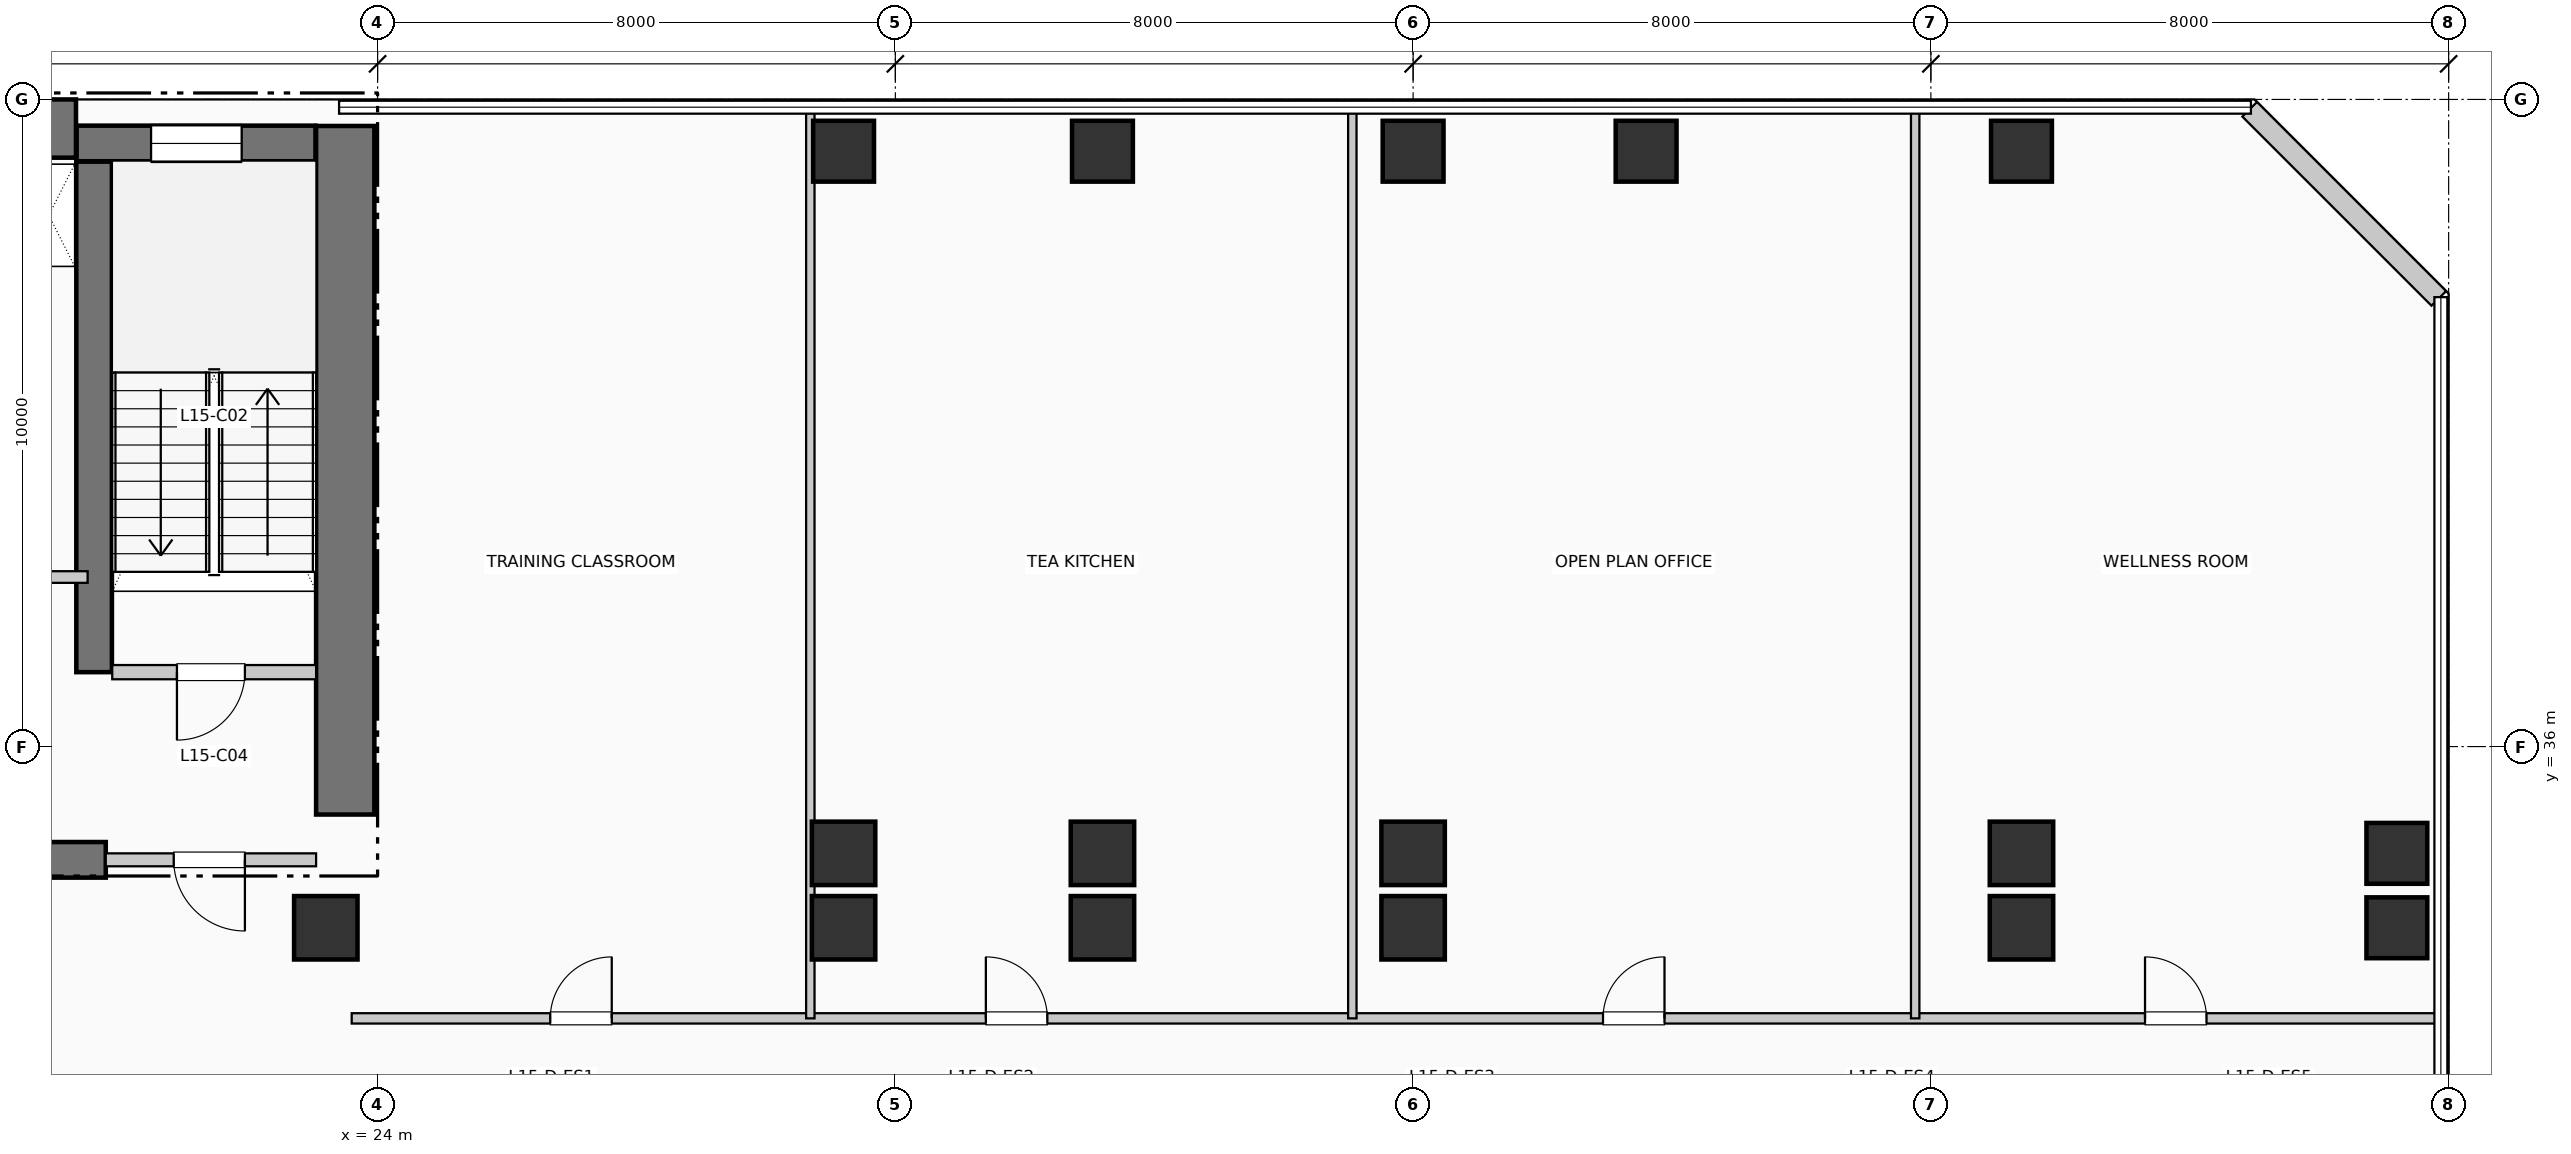
"""IFC4 building model, lengths in metres.
Left out: names, types, materials, properties, quantities, classifications, styles, units other than length and angle.
Written with IfcOpenShell. Run it as: python <this file> out.ifc"""

import sys

from ifc_helpers import new_model, si_unit, direction, frame, frame_2d, origin, origin_2d, place, context, subcontext, project, spatial, rectangle, extrude, element, fill, save


model = new_model("IFC4")
c1 = context("Model", 3, precision=1e-05, world=origin(), true_north=direction((0.0, 1.0)))
c2 = subcontext(c1, "Body", "Model", "MODEL_VIEW")
j1 = project(units=[si_unit("LENGTHUNIT", "METRE"), si_unit("PLANEANGLEUNIT", "RADIAN")], contexts=[c1])
p1 = place(None, origin())
s1 = spatial("IfcSite", under=j1, at=p1, CompositionType="ELEMENT")
p2 = place(p1, origin())
s2 = spatial("IfcBuilding", under=s1, at=p2, CompositionType="ELEMENT")
p3 = place(p2, frame((0.0, 0.0, 66.0)))
s3 = spatial("IfcBuildingStorey", under=s2, at=p3, CompositionType="ELEMENT", Elevation=66.0)
p4 = place(p3, frame((5.36, 45.55, 0.0), z_axis=(0.0, 0.0, 1.0), x_axis=(1.0, 0.0, 0.0)))
e1 = element("IfcWall", 1, at=p4, inside=s3, PredefinedType="SHEAR", context=c2, shape_type="SweptSolid", body=[
    extrude(rectangle(XDim=13.98, YDim=0.9, at=frame_2d((6.99, 0.0))), origin(), (0.0, 0.0, 1.0), 3.96),
])
p5 = place(p3, frame((23.5, 34.95, 0.0), z_axis=(0.0, 0.0, 1.0), x_axis=(0.0, 1.0, 0.0)))
e2 = element("IfcWall", 2, at=p5, inside=s3, PredefinedType="SHEAR", context=c2, shape_type="SweptSolid", body=[
    extrude(rectangle(XDim=10.64, YDim=0.9, at=frame_2d((5.32, 0.0))), origin(), (0.0, 0.0, 1.0), 3.96),
])
p6 = place(p3, frame((13.68, 34.25, 0.0), z_axis=(0.0, 0.0, 1.0), x_axis=(1.0, 0.0, 0.0)))
e3 = element("IfcWall", 3, at=p6, inside=s3, PredefinedType="SHEAR", context=c2, shape_type="SweptSolid", body=[
    extrude(rectangle(XDim=6.12, YDim=0.55, at=frame_2d((3.06, 0.0))), origin(), (0.0, 0.0, 1.0), 3.96),
])
p7 = place(p3, frame((19.62, 37.15, 0.0), z_axis=(0.0, 0.0, 1.0), x_axis=(0.0, 1.0, 0.0)))
e4 = element("IfcWall", 4, at=p7, inside=s3, PredefinedType="SHEAR", context=c2, shape_type="SweptSolid", body=[
    extrude(rectangle(XDim=7.89, YDim=0.55, at=frame_2d((3.945, 0.0))), origin(), (0.0, 0.0, 1.0), 3.96),
])
p8 = place(p3, frame((19.35, 45.32, 0.0), z_axis=(0.0, 0.0, 1.0), x_axis=(1.0, 0.0, 0.0)))
e5 = element("IfcWall", 5, at=p8, inside=s3, PredefinedType="SHEAR", context=c2, shape_type="SweptSolid", body=[
    extrude(rectangle(XDim=3.69, YDim=0.55, at=frame_2d((1.845, 0.0))), origin(), (0.0, 0.0, 1.0), 3.96),
])
p9 = place(p8, frame((1.15, 0.0, 1.05)))
e6 = element("IfcOpeningElement", 6, at=p9, cuts=e5, PredefinedType="OPENING", context=c2, shape_type="SweptSolid", body=[
    extrude(rectangle(XDim=1.4, YDim=1.8, at=frame_2d((0.7, 0.9))), frame((0.0, 0.285, 0.0), z_axis=(0.0, -1.0, 0.0), x_axis=(1.0, 0.0, 0.0)), (0.0, 0.0, 1.0), 0.57),
])
for number, where, z_axis, x_axis in (
    (7, (23.2, 33.2, 0.0), (0.0, 0.0, 1.0), (1.0, 0.0, 0.0)),
    (8, (31.2, 33.2, 0.0), (0.0, 0.0, 1.0), (1.0, 0.0, 0.0)),
    (9, (31.2, 34.35, 0.0), (0.0, 0.0, 1.0), (1.0, 0.0, 0.0)),
):
    element("IfcColumn", number, at=place(p3, frame(where, z_axis=z_axis, x_axis=x_axis)), inside=s3, PredefinedType="COLUMN", context=c2, shape_type="SweptSolid", body=[
        extrude(rectangle(XDim=0.98, YDim=0.98, at=origin_2d()), origin(), (0.0, 0.0, 1.0), 3.96),
    ])
p10 = place(p3, frame((31.2, 45.2, 0.0), z_axis=(0.0, 0.0, 1.0), x_axis=(1.0, 0.0, 0.0)))
e10 = element("IfcColumn", 10, at=p10, inside=s3, PredefinedType="COLUMN", context=c2, shape_type="SweptSolid", body=[
    extrude(rectangle(XDim=0.94, YDim=0.94, at=origin_2d()), origin(), (0.0, 0.0, 1.0), 3.96),
])
for number, where, z_axis, x_axis in (
    (11, (35.2, 33.2, 0.0), (0.0, 0.0, 1.0), (1.0, 0.0, 0.0)),
    (12, (35.2, 34.35, 0.0), (0.0, 0.0, 1.0), (1.0, 0.0, 0.0)),
):
    element("IfcColumn", number, at=place(p3, frame(where, z_axis=z_axis, x_axis=x_axis)), inside=s3, PredefinedType="COLUMN", context=c2, shape_type="SweptSolid", body=[
        extrude(rectangle(XDim=0.98, YDim=0.98, at=origin_2d()), origin(), (0.0, 0.0, 1.0), 3.96),
    ])
p11 = place(p3, frame((35.2, 45.2, 0.0), z_axis=(0.0, 0.0, 1.0), x_axis=(1.0, 0.0, 0.0)))
e13 = element("IfcColumn", 13, at=p11, inside=s3, PredefinedType="COLUMN", context=c2, shape_type="SweptSolid", body=[
    extrude(rectangle(XDim=0.94, YDim=0.94, at=origin_2d()), origin(), (0.0, 0.0, 1.0), 3.96),
])
for number, where, z_axis, x_axis in (
    (14, (40.0, 33.2, 0.0), (0.0, 0.0, 1.0), (1.0, 0.0, 0.0)),
    (15, (40.0, 34.35, 0.0), (0.0, 0.0, 1.0), (1.0, 0.0, 0.0)),
):
    element("IfcColumn", number, at=place(p3, frame(where, z_axis=z_axis, x_axis=x_axis)), inside=s3, PredefinedType="COLUMN", context=c2, shape_type="SweptSolid", body=[
        extrude(rectangle(XDim=0.98, YDim=0.98, at=origin_2d()), origin(), (0.0, 0.0, 1.0), 3.96),
    ])
for number, where, z_axis, x_axis in (
    (16, (40.0, 45.2, 0.0), (0.0, 0.0, 1.0), (1.0, 0.0, 0.0)),
    (17, (43.6, 45.2, 0.0), (0.0, 0.0, 1.0), (1.0, 0.0, 0.0)),
):
    element("IfcColumn", number, at=place(p3, frame(where, z_axis=z_axis, x_axis=x_axis)), inside=s3, PredefinedType="COLUMN", context=c2, shape_type="SweptSolid", body=[
        extrude(rectangle(XDim=0.94, YDim=0.94, at=origin_2d()), origin(), (0.0, 0.0, 1.0), 3.96),
    ])
for number, where, z_axis, x_axis in (
    (18, (49.4, 33.2, 0.0), (0.0, 0.0, 1.0), (1.0, 0.0, 0.0)),
    (19, (49.4, 34.35, 0.0), (0.0, 0.0, 1.0), (1.0, 0.0, 0.0)),
):
    element("IfcColumn", number, at=place(p3, frame(where, z_axis=z_axis, x_axis=x_axis)), inside=s3, PredefinedType="COLUMN", context=c2, shape_type="SweptSolid", body=[
        extrude(rectangle(XDim=0.98, YDim=0.98, at=origin_2d()), origin(), (0.0, 0.0, 1.0), 3.96),
    ])
for number, where, z_axis, x_axis in (
    (20, (49.4, 45.2, 0.0), (0.0, 0.0, 1.0), (1.0, 0.0, 0.0)),
    (21, (55.2, 33.2, 0.0), (0.0, 0.0, 1.0), (1.0, 0.0, 0.0)),
    (22, (55.2, 34.35, 0.0), (0.0, 0.0, 1.0), (1.0, 0.0, 0.0)),
):
    element("IfcColumn", number, at=place(p3, frame(where, z_axis=z_axis, x_axis=x_axis)), inside=s3, PredefinedType="COLUMN", context=c2, shape_type="SweptSolid", body=[
        extrude(rectangle(XDim=0.94, YDim=0.94, at=origin_2d()), origin(), (0.0, 0.0, 1.0), 3.96),
    ])
p12 = place(p3, frame((55.848, 42.926, 0.0), z_axis=(0.0, 0.0, 1.0), x_axis=(-0.707106781187, 0.707106781187, 0.0)))
e23 = element("IfcWall", 23, at=p12, inside=s3, PredefinedType="SOLIDWALL", context=c2, shape_type="SweptSolid", body=[
    extrude(rectangle(XDim=4.133, YDim=0.32, at=frame_2d((2.066, 0.0))), origin(), (0.0, 0.0, 1.0), 3.71),
])
p13 = place(p3, frame((19.9, 37.15, 0.0), z_axis=(0.0, 0.0, 1.0), x_axis=(1.0, 0.0, 0.0)))
e24 = element("IfcWall", 24, at=p13, inside=s3, PredefinedType="PARTITIONING", context=c2, shape_type="SweptSolid", body=[
    extrude(rectangle(XDim=3.15, YDim=0.22, at=frame_2d((1.575, 0.0))), origin(), (0.0, 0.0, 1.0), 3.71),
])
p14 = place(p13, frame((2.05, 0.0, 0.0), z_axis=(0.0, 0.0, 1.0), x_axis=(-1.0, 0.0, 0.0)))
e25 = element("IfcOpeningElement", 25, at=p14, cuts=e24, PredefinedType="OPENING", context=c2, shape_type="SweptSolid", body=[
    extrude(rectangle(XDim=1.05, YDim=2.15, at=frame_2d((0.525, 1.075))), frame((0.0, 0.12, 0.0), z_axis=(0.0, -1.0, 0.0), x_axis=(1.0, 0.0, 0.0)), (0.0, 0.0, 1.0), 0.24),
])
p15 = place(p3, frame((19.8, 34.25, 0.0), z_axis=(0.0, 0.0, 1.0), x_axis=(1.0, 0.0, 0.0)))
e26 = element("IfcWall", 26, at=p15, inside=s3, PredefinedType="PARTITIONING", context=c2, shape_type="SweptSolid", body=[
    extrude(rectangle(XDim=3.25, YDim=0.2, at=frame_2d((1.625, 0.0))), origin(), (0.0, 0.0, 1.0), 3.71),
])
p16 = place(p15, frame((2.15, 0.0, 0.0), z_axis=(0.0, 0.0, 1.0), x_axis=(-1.0, 0.0, 0.0)))
e27 = element("IfcOpeningElement", 27, at=p16, cuts=e26, PredefinedType="OPENING", context=c2, shape_type="SweptSolid", body=[
    extrude(rectangle(XDim=1.1, YDim=2.15, at=frame_2d((0.55, 1.075))), frame((0.0, 0.11, 0.0), z_axis=(0.0, -1.0, 0.0), x_axis=(1.0, 0.0, 0.0)), (0.0, 0.0, 1.0), 0.22),
])
p17 = place(p3, frame((17.68, 38.62, 0.0), z_axis=(0.0, 0.0, 1.0), x_axis=(1.0, 0.0, 0.0)))
e28 = element("IfcWall", 28, at=p17, inside=s3, PredefinedType="PARTITIONING", context=c2, shape_type="SweptSolid", body=[
    extrude(rectangle(XDim=1.84, YDim=0.18, at=frame_2d((0.92, 0.0))), origin(), (0.0, 0.0, 1.0), 3.71),
])
p18 = place(p17, frame((0.24, 0.0, 0.0)))
e29 = element("IfcOpeningElement", 29, at=p18, cuts=e28, PredefinedType="OPENING", context=c2, shape_type="SweptSolid", body=[
    extrude(rectangle(XDim=0.92, YDim=2.1, at=frame_2d((0.46, 1.05))), frame((0.0, 0.1, 0.0), z_axis=(0.0, -1.0, 0.0), x_axis=(1.0, 0.0, 0.0)), (0.0, 0.0, 1.0), 0.2),
])
p19 = place(p3, frame((23.6, 31.8, 0.0), z_axis=(0.0, 0.0, 1.0), x_axis=(1.0, 0.0, 0.0)))
e30 = element("IfcWall", 30, at=p19, inside=s3, PredefinedType="PARTITIONING", context=c2, shape_type="SweptSolid", body=[
    extrude(rectangle(XDim=32.21, YDim=0.16, at=frame_2d((16.105, 0.0))), origin(), (0.0, 0.0, 1.0), 3.71),
])
p20 = place(p19, frame((3.068, 0.0, 0.0)))
e31 = element("IfcOpeningElement", 31, at=p20, cuts=e30, PredefinedType="OPENING", context=c2, shape_type="SweptSolid", body=[
    extrude(rectangle(XDim=0.95, YDim=2.15, at=frame_2d((0.475, 1.075))), frame((0.0, 0.09, 0.0), z_axis=(0.0, -1.0, 0.0), x_axis=(1.0, 0.0, 0.0)), (0.0, 0.0, 1.0), 0.18),
])
p21 = place(p19, frame((9.799, 0.0, 0.0)))
e32 = element("IfcOpeningElement", 32, at=p21, cuts=e30, PredefinedType="OPENING", context=c2, shape_type="SweptSolid", body=[
    extrude(rectangle(XDim=0.95, YDim=2.15, at=frame_2d((0.475, 1.075))), frame((0.0, 0.09, 0.0), z_axis=(0.0, -1.0, 0.0), x_axis=(1.0, 0.0, 0.0)), (0.0, 0.0, 1.0), 0.18),
])
p22 = place(p19, frame((19.334, 0.0, 0.0)))
e33 = element("IfcOpeningElement", 33, at=p22, cuts=e30, PredefinedType="OPENING", context=c2, shape_type="SweptSolid", body=[
    extrude(rectangle(XDim=0.95, YDim=2.15, at=frame_2d((0.475, 1.075))), frame((0.0, 0.09, 0.0), z_axis=(0.0, -1.0, 0.0), x_axis=(1.0, 0.0, 0.0)), (0.0, 0.0, 1.0), 0.18),
])
p23 = place(p19, frame((27.709, 0.0, 0.0)))
e34 = element("IfcOpeningElement", 34, at=p23, cuts=e30, PredefinedType="OPENING", context=c2, shape_type="SweptSolid", body=[
    extrude(rectangle(XDim=0.95, YDim=2.15, at=frame_2d((0.475, 1.075))), frame((0.0, 0.09, 0.0), z_axis=(0.0, -1.0, 0.0), x_axis=(1.0, 0.0, 0.0)), (0.0, 0.0, 1.0), 0.18),
])
for number, where, z_axis, x_axis in (
    (35, (30.686, 31.8, 0.0), (0.0, 0.0, 1.0), (0.0, 1.0, 0.0)),
    (36, (39.061, 31.8, 0.0), (0.0, 0.0, 1.0), (0.0, 1.0, 0.0)),
    (37, (47.758, 31.8, 0.0), (0.0, 0.0, 1.0), (0.0, 1.0, 0.0)),
):
    element("IfcWall", number, at=place(p3, frame(where, z_axis=z_axis, x_axis=x_axis)), inside=s3, PredefinedType="PARTITIONING", context=c2, shape_type="SweptSolid", body=[
        extrude(rectangle(XDim=14.01, YDim=0.13, at=frame_2d((7.005, 0.0))), origin(), (0.0, 0.0, 1.0), 3.71),
    ])
p24 = place(p9, origin())
e38 = element("IfcWindow", 38, at=p24, inside=s3, PartitioningType="SINGLE_PANEL", PredefinedType="WINDOW", context=c2, shape_type="SweptSolid", body=[
    extrude(rectangle(XDim=1.4, YDim=1.8, at=frame_2d((0.7, 0.9))), frame((0.0, 0.03, 0.0), z_axis=(0.0, -1.0, 0.0), x_axis=(1.0, 0.0, 0.0)), (0.0, 0.0, 1.0), 0.06),
])
fill(e6, e38)
p25 = place(p14, origin())
e39 = element("IfcDoor", 39, at=p25, inside=s3, OperationType="SINGLE_SWING_LEFT", PredefinedType="DOOR", context=c2, shape_type="SweptSolid", body=[
    extrude(rectangle(XDim=1.05, YDim=2.15, at=frame_2d((0.525, 1.075))), frame((0.0, 0.025, 0.0), z_axis=(0.0, -1.0, 0.0), x_axis=(1.0, 0.0, 0.0)), (0.0, 0.0, 1.0), 0.05),
])
fill(e25, e39)
p26 = place(p16, origin())
e40 = element("IfcDoor", 40, at=p26, inside=s3, OperationType="SINGLE_SWING_RIGHT", PredefinedType="DOOR", context=c2, shape_type="SweptSolid", body=[
    extrude(rectangle(XDim=1.1, YDim=2.15, at=frame_2d((0.55, 1.075))), frame((0.0, 0.025, 0.0), z_axis=(0.0, -1.0, 0.0), x_axis=(1.0, 0.0, 0.0)), (0.0, 0.0, 1.0), 0.05),
])
fill(e27, e40)
p27 = place(p20, origin())
e41 = element("IfcDoor", 41, at=p27, inside=s3, OperationType="SINGLE_SWING_RIGHT", PredefinedType="DOOR", context=c2, shape_type="SweptSolid", body=[
    extrude(rectangle(XDim=0.95, YDim=2.15, at=frame_2d((0.475, 1.075))), frame((0.0, 0.025, 0.0), z_axis=(0.0, -1.0, 0.0), x_axis=(1.0, 0.0, 0.0)), (0.0, 0.0, 1.0), 0.05),
])
fill(e31, e41)
p28 = place(p21, origin())
e42 = element("IfcDoor", 42, at=p28, inside=s3, OperationType="SINGLE_SWING_LEFT", PredefinedType="DOOR", context=c2, shape_type="SweptSolid", body=[
    extrude(rectangle(XDim=0.95, YDim=2.15, at=frame_2d((0.475, 1.075))), frame((0.0, 0.025, 0.0), z_axis=(0.0, -1.0, 0.0), x_axis=(1.0, 0.0, 0.0)), (0.0, 0.0, 1.0), 0.05),
])
fill(e32, e42)
p29 = place(p22, origin())
e43 = element("IfcDoor", 43, at=p29, inside=s3, OperationType="SINGLE_SWING_RIGHT", PredefinedType="DOOR", context=c2, shape_type="SweptSolid", body=[
    extrude(rectangle(XDim=0.95, YDim=2.15, at=frame_2d((0.475, 1.075))), frame((0.0, 0.025, 0.0), z_axis=(0.0, -1.0, 0.0), x_axis=(1.0, 0.0, 0.0)), (0.0, 0.0, 1.0), 0.05),
])
fill(e33, e43)
p30 = place(p23, origin())
e44 = element("IfcDoor", 44, at=p30, inside=s3, OperationType="SINGLE_SWING_LEFT", PredefinedType="DOOR", context=c2, shape_type="SweptSolid", body=[
    extrude(rectangle(XDim=0.95, YDim=2.15, at=frame_2d((0.475, 1.075))), frame((0.0, 0.025, 0.0), z_axis=(0.0, -1.0, 0.0), x_axis=(1.0, 0.0, 0.0)), (0.0, 0.0, 1.0), 0.05),
])
fill(e34, e44)
save(model, sys.argv[1])
